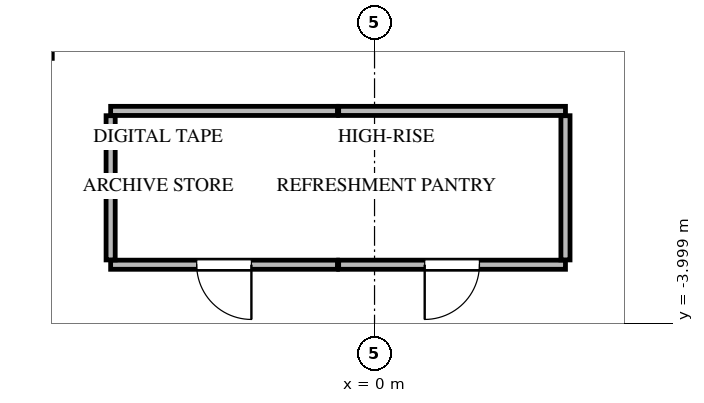
"""IFC4 building model, lengths in metres.
Left out: names, types, materials, properties, quantities, classifications, styles, units other than length and angle.
Written with IfcOpenShell. Run it as: python <this file> out.ifc"""

import sys

from ifc_helpers import new_model, si_unit, direction, frame, frame_2d, origin, place, context, subcontext, project, spatial, rectangle, extrude, source, transform, mapped, element, fill, save


model = new_model("IFC4")
c1 = context("Model", 3, precision=1e-05, world=origin(), true_north=direction((0.0, 1.0)))
c2 = subcontext(c1, "Body", "Model", "MODEL_VIEW")
j1 = project(units=[si_unit("LENGTHUNIT", "METRE"), si_unit("PLANEANGLEUNIT", "RADIAN")], contexts=[c1])
p1 = place(None, origin())
s1 = spatial("IfcSite", under=j1, at=p1, CompositionType="ELEMENT")
p2 = place(p1, origin())
s2 = spatial("IfcBuilding", under=s1, at=p2, CompositionType="ELEMENT")
p3 = place(p2, frame((0.0, 0.0, 213.4)))
s3 = spatial("IfcBuildingStorey", under=s2, at=p3, CompositionType="ELEMENT", Elevation=213.4)
p4 = place(p3, frame((-5.4, 0.354, 0.0), z_axis=(0.0, 0.0, 1.0), x_axis=(0.0, 1.0, 0.0)))
e1 = element("IfcWall", 1, at=p4, inside=s3, PredefinedType="SOLIDWALL", context=c2, shape_type="SweptSolid", body=[
    extrude(rectangle(XDim=4.026, YDim=0.2, at=frame_2d((2.013, 0.0))), origin(), (0.0, 0.0, 1.0), 4.645),
])
p5 = place(p4, frame((0.246, 0.0, 0.0)))
e2 = element("IfcOpeningElement", 2, at=p5, cuts=e1, PredefinedType="OPENING", context=c2, shape_type="SweptSolid", body=[
    extrude(rectangle(XDim=1.0, YDim=2.15, at=frame_2d((0.5, 1.075))), frame((0.0, 0.11, 0.0), z_axis=(0.0, -1.0, 0.0), x_axis=(1.0, 0.0, 0.0)), (0.0, 0.0, 1.0), 0.22),
])
p6 = place(p3, frame((-0.61, -3.04, 0.0), z_axis=(0.0, 0.0, 1.0), x_axis=(-1.0, 0.0, 0.0)))
e3 = element("IfcWall", 3, at=p6, inside=s3, PredefinedType="PARTITIONING", context=c2, shape_type="SweptSolid", body=[
    extrude(rectangle(XDim=3.73, YDim=0.15, at=frame_2d((1.865, 0.0))), origin(), (0.0, 0.0, 1.0), 4.645),
])
p7 = place(p6, frame((1.415, 0.0, 0.0)))
e4 = element("IfcOpeningElement", 4, at=p7, cuts=e3, PredefinedType="OPENING", context=c2, shape_type="SweptSolid", body=[
    extrude(rectangle(XDim=0.9, YDim=2.05, at=frame_2d((0.45, 1.025))), frame((0.0, 0.085, 0.0), z_axis=(0.0, -1.0, 0.0), x_axis=(1.0, 0.0, 0.0)), (0.0, 0.0, 1.0), 0.17),
])
p8 = place(p3, frame((-4.34, -0.51, 0.0), z_axis=(0.0, 0.0, 1.0), x_axis=(1.0, 0.0, 0.0)))
e5 = element("IfcWall", 5, at=p8, inside=s3, PredefinedType="PARTITIONING", context=c2, shape_type="SweptSolid", body=[
    extrude(rectangle(XDim=3.73, YDim=0.15, at=frame_2d((1.865, 0.0))), origin(), (0.0, 0.0, 1.0), 4.645),
])
p9 = place(p3, frame((-4.34, -2.961, 0.0), z_axis=(0.0, 0.0, 1.0), x_axis=(0.0, 1.0, 0.0)))
e6 = element("IfcWall", 6, at=p9, inside=s3, PredefinedType="PARTITIONING", context=c2, shape_type="SweptSolid", body=[
    extrude(rectangle(XDim=2.372, YDim=0.15, at=frame_2d((1.186, 0.0))), origin(), (0.0, 0.0, 1.0), 4.645),
])
p10 = place(p3, frame((3.14, -3.04, 0.0), z_axis=(0.0, 0.0, 1.0), x_axis=(-1.0, 0.0, 0.0)))
e7 = element("IfcWall", 7, at=p10, inside=s3, PredefinedType="PARTITIONING", context=c2, shape_type="SweptSolid", body=[
    extrude(rectangle(XDim=3.73, YDim=0.15, at=frame_2d((1.865, 0.0))), origin(), (0.0, 0.0, 1.0), 4.645),
])
p11 = place(p10, frame((1.415, 0.0, 0.0)))
e8 = element("IfcOpeningElement", 8, at=p11, cuts=e7, PredefinedType="OPENING", context=c2, shape_type="SweptSolid", body=[
    extrude(rectangle(XDim=0.9, YDim=2.05, at=frame_2d((0.45, 1.025))), frame((0.0, 0.085, 0.0), z_axis=(0.0, -1.0, 0.0), x_axis=(1.0, 0.0, 0.0)), (0.0, 0.0, 1.0), 0.17),
])
p12 = place(p3, frame((-0.59, -0.51, 0.0), z_axis=(0.0, 0.0, 1.0), x_axis=(1.0, 0.0, 0.0)))
e9 = element("IfcWall", 9, at=p12, inside=s3, PredefinedType="PARTITIONING", context=c2, shape_type="SweptSolid", body=[
    extrude(rectangle(XDim=3.73, YDim=0.15, at=frame_2d((1.865, 0.0))), origin(), (0.0, 0.0, 1.0), 4.645),
])
p13 = place(p3, frame((3.14, -0.589, 0.0), z_axis=(0.0, 0.0, 1.0), x_axis=(0.0, -1.0, 0.0)))
e10 = element("IfcWall", 10, at=p13, inside=s3, PredefinedType="PARTITIONING", context=c2, shape_type="SweptSolid", body=[
    extrude(rectangle(XDim=2.372, YDim=0.15, at=frame_2d((1.186, 0.0))), origin(), (0.0, 0.0, 1.0), 4.645),
])
m1 = source(origin(), c2, "Body", "SweptSolid", [
    extrude(rectangle(XDim=0.9, YDim=2.05, at=frame_2d((0.45, 1.025))), frame((0.0, 0.025, 0.0), z_axis=(0.0, -1.0, 0.0), x_axis=(1.0, 0.0, 0.0)), (0.0, 0.0, 1.0), 0.05),
])
p14 = place(p7, origin())
e11 = element("IfcDoor", 11, at=p14, inside=s3, OperationType="SINGLE_SWING_LEFT", PredefinedType="DOOR", context=c2, shape_type="MappedRepresentation", body=[
    mapped(m1, transform((0.0, 0.0, 0.0), x_axis=(1.0, 0.0, 0.0), y_axis=(0.0, 1.0, 0.0), z_axis=(0.0, 0.0, 1.0), scale=1.0)),
])
fill(e4, e11)
m2 = source(origin(), c2, "Body", "SweptSolid", [
    extrude(rectangle(XDim=0.9, YDim=2.05, at=frame_2d((0.45, 1.025))), frame((0.0, 0.025, 0.0), z_axis=(0.0, -1.0, 0.0), x_axis=(1.0, 0.0, 0.0)), (0.0, 0.0, 1.0), 0.05),
])
p15 = place(p11, origin())
e12 = element("IfcDoor", 12, at=p15, inside=s3, OperationType="SINGLE_SWING_RIGHT", PredefinedType="DOOR", context=c2, shape_type="MappedRepresentation", body=[
    mapped(m2, transform((0.0, 0.0, 0.0), x_axis=(1.0, 0.0, 0.0), y_axis=(0.0, 1.0, 0.0), z_axis=(0.0, 0.0, 1.0), scale=1.0)),
])
fill(e8, e12)
save(model, sys.argv[1])
